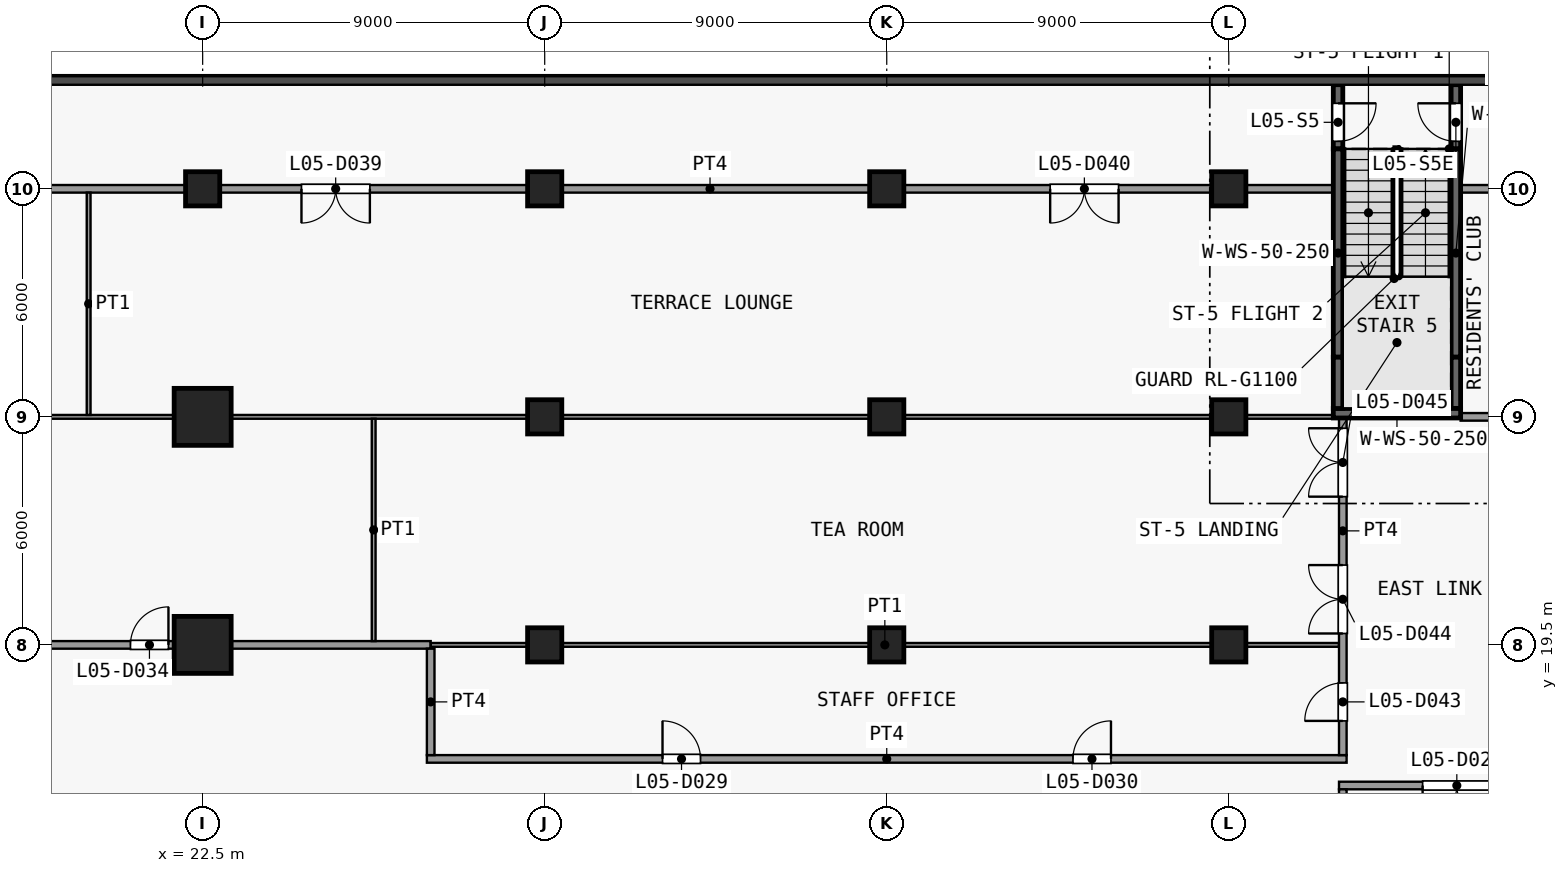
"""IFC4 building model, lengths in metres.
Left out: names, types, materials, properties, quantities, classifications, styles, units other than length and angle.
Written with IfcOpenShell. Run it as: python <this file> out.ifc"""

import sys

from ifc_helpers import new_model, si_unit, direction, frame, frame_2d, origin, origin_2d, place, context, subcontext, project, spatial, rectangle, extrude, element, fill, save


model = new_model("IFC4")
c1 = context("Model", 3, precision=1e-05, world=origin(), true_north=direction((0.0, 1.0)))
c2 = subcontext(c1, "Body", "Model", "MODEL_VIEW")
j1 = project(units=[si_unit("LENGTHUNIT", "METRE"), si_unit("PLANEANGLEUNIT", "RADIAN")], contexts=[c1])
p1 = place(None, origin())
s1 = spatial("IfcSite", under=j1, at=p1, CompositionType="ELEMENT")
p2 = place(p1, origin())
s2 = spatial("IfcBuilding", under=s1, at=p2, CompositionType="ELEMENT")
p3 = place(p2, frame((0.0, 0.0, 28.0)))
s3 = spatial("IfcBuildingStorey", under=s2, at=p3, CompositionType="ELEMENT", Elevation=28.0)
for number, where, z_axis, x_axis in (
    (1, (22.5, 19.5, 0.0), (0.0, 0.0, 1.0), (1.0, 0.0, 0.0)),
    (2, (22.5, 25.5, 0.0), (0.0, 0.0, 1.0), (1.0, 0.0, 0.0)),
):
    element("IfcColumn", number, at=place(p3, frame(where, z_axis=z_axis, x_axis=x_axis)), inside=s3, PredefinedType="COLUMN", context=c2, shape_type="SweptSolid", body=[
        extrude(rectangle(XDim=1.5, YDim=1.5, at=origin_2d()), origin(), (0.0, 0.0, 1.0), 4.5),
    ])
for number, where, z_axis, x_axis in (
    (3, (22.5, 31.5, 0.0), (0.0, 0.0, 1.0), (1.0, 0.0, 0.0)),
    (4, (31.5, 19.5, 0.0), (0.0, 0.0, 1.0), (1.0, 0.0, 0.0)),
    (5, (31.5, 25.5, 0.0), (0.0, 0.0, 1.0), (1.0, 0.0, 0.0)),
    (6, (31.5, 31.5, 0.0), (0.0, 0.0, 1.0), (1.0, 0.0, 0.0)),
    (7, (40.5, 19.5, 0.0), (0.0, 0.0, 1.0), (1.0, 0.0, 0.0)),
    (8, (40.5, 25.5, 0.0), (0.0, 0.0, 1.0), (1.0, 0.0, 0.0)),
    (9, (40.5, 31.5, 0.0), (0.0, 0.0, 1.0), (1.0, 0.0, 0.0)),
    (10, (49.5, 19.5, 0.0), (0.0, 0.0, 1.0), (1.0, 0.0, 0.0)),
    (11, (49.5, 25.5, 0.0), (0.0, 0.0, 1.0), (1.0, 0.0, 0.0)),
    (12, (49.5, 31.5, 0.0), (0.0, 0.0, 1.0), (1.0, 0.0, 0.0)),
):
    element("IfcColumn", number, at=place(p3, frame(where, z_axis=z_axis, x_axis=x_axis)), inside=s3, PredefinedType="COLUMN", context=c2, shape_type="SweptSolid", body=[
        extrude(rectangle(XDim=0.9, YDim=0.9, at=origin_2d()), origin(), (0.0, 0.0, 1.0), 4.5),
    ])
p4 = place(p3, frame((52.375, 34.24, 0.0), z_axis=(0.0, 0.0, 1.0), x_axis=(0.0, -1.0, 0.0)))
e13 = element("IfcWall", 13, at=p4, inside=s3, PredefinedType="SHEAR", context=c2, shape_type="SweptSolid", body=[
    extrude(rectangle(XDim=1.69, YDim=0.25, at=frame_2d((0.845, 0.0))), origin(), (0.0, 0.0, 1.0), 4.1),
])
p5 = place(p4, frame((0.49, 0.0, 0.0)))
e14 = element("IfcOpeningElement", 14, at=p5, cuts=e13, PredefinedType="OPENING", context=c2, shape_type="SweptSolid", body=[
    extrude(rectangle(XDim=1.0, YDim=2.1, at=frame_2d((0.5, 1.05))), frame((0.0, 0.135, 0.0), z_axis=(0.0, -1.0, 0.0), x_axis=(1.0, 0.0, 0.0)), (0.0, 0.0, 1.0), 0.27),
])
p6 = place(p3, frame((52.375, 27.07, 0.0), z_axis=(0.0, 0.0, 1.0), x_axis=(0.0, 1.0, 0.0)))
e15 = element("IfcWall", 15, at=p6, inside=s3, PredefinedType="SHEAR", context=c2, shape_type="SweptSolid", body=[
    extrude(rectangle(XDim=5.48, YDim=0.25, at=frame_2d((2.74, 0.0))), origin(), (0.0, 0.0, 1.0), 4.1),
])
p7 = place(p3, frame((52.375, 25.72, 0.0), z_axis=(0.0, 0.0, 1.0), x_axis=(0.0, 1.0, 0.0)))
e16 = element("IfcWall", 16, at=p7, inside=s3, PredefinedType="SHEAR", context=c2, shape_type="SweptSolid", body=[
    extrude(rectangle(XDim=1.35, YDim=0.25, at=frame_2d((0.675, 0.0))), origin(), (0.0, 0.0, 1.0), 4.1),
])
p8 = place(p3, frame((55.475, 32.55, 0.0), z_axis=(0.0, 0.0, 1.0), x_axis=(0.0, 1.0, 0.0)))
e17 = element("IfcWall", 17, at=p8, inside=s3, PredefinedType="SHEAR", context=c2, shape_type="SweptSolid", body=[
    extrude(rectangle(XDim=1.69, YDim=0.25, at=frame_2d((0.845, 0.0))), origin(), (0.0, 0.0, 1.0), 4.1),
])
p9 = place(p8, frame((0.2, 0.0, 0.0)))
e18 = element("IfcOpeningElement", 18, at=p9, cuts=e17, PredefinedType="OPENING", context=c2, shape_type="SweptSolid", body=[
    extrude(rectangle(XDim=1.0, YDim=2.1, at=frame_2d((0.5, 1.05))), frame((0.0, 0.135, 0.0), z_axis=(0.0, -1.0, 0.0), x_axis=(1.0, 0.0, 0.0)), (0.0, 0.0, 1.0), 0.27),
])
p10 = place(p3, frame((55.475, 27.07, 0.0), z_axis=(0.0, 0.0, 1.0), x_axis=(0.0, 1.0, 0.0)))
e19 = element("IfcWall", 19, at=p10, inside=s3, PredefinedType="SHEAR", context=c2, shape_type="SweptSolid", body=[
    extrude(rectangle(XDim=5.48, YDim=0.25, at=frame_2d((2.74, 0.0))), origin(), (0.0, 0.0, 1.0), 4.1),
])
p11 = place(p3, frame((55.475, 25.72, 0.0), z_axis=(0.0, 0.0, 1.0), x_axis=(0.0, 1.0, 0.0)))
e20 = element("IfcWall", 20, at=p11, inside=s3, PredefinedType="SHEAR", context=c2, shape_type="SweptSolid", body=[
    extrude(rectangle(XDim=1.35, YDim=0.25, at=frame_2d((0.675, 0.0))), origin(), (0.0, 0.0, 1.0), 4.1),
])
p12 = place(p3, frame((52.25, 25.595, 0.0), z_axis=(0.0, 0.0, 1.0), x_axis=(1.0, 0.0, 0.0)))
e21 = element("IfcWall", 21, at=p12, inside=s3, PredefinedType="SHEAR", context=c2, shape_type="SweptSolid", body=[
    extrude(rectangle(XDim=3.35, YDim=0.25, at=frame_2d((1.675, 0.0))), origin(), (0.0, 0.0, 1.0), 4.1),
])
p13 = place(p3, frame((52.4, 15.8, 0.0), z_axis=(0.0, 0.0, 1.0), x_axis=(1.0, 0.0, 0.0)))
e22 = element("IfcWall", 22, at=p13, inside=s3, PredefinedType="PARTITIONING", context=c2, shape_type="SweptSolid", body=[
    extrude(rectangle(XDim=6.2, YDim=0.2, at=frame_2d((3.1, 0.0))), origin(), (0.0, 0.0, 1.0), 4.1),
])
p14 = place(p13, frame((2.2, 0.0, 0.0)))
e23 = element("IfcOpeningElement", 23, at=p14, cuts=e22, PredefinedType="OPENING", context=c2, shape_type="SweptSolid", body=[
    extrude(rectangle(XDim=1.8, YDim=2.1, at=frame_2d((0.9, 1.05))), frame((0.0, 0.11, 0.0), z_axis=(0.0, -1.0, 0.0), x_axis=(1.0, 0.0, 0.0)), (0.0, 0.0, 1.0), 0.22),
])
p15 = place(p3, frame((28.4, 16.5, 0.0), z_axis=(0.0, 0.0, 1.0), x_axis=(1.0, 0.0, 0.0)))
e24 = element("IfcWall", 24, at=p15, inside=s3, PredefinedType="PARTITIONING", context=c2, shape_type="SweptSolid", body=[
    extrude(rectangle(XDim=24.2, YDim=0.2, at=frame_2d((12.1, 0.0))), origin(), (0.0, 0.0, 1.0), 4.1),
])
p16 = place(p15, frame((6.2, 0.0, 0.0)))
e25 = element("IfcOpeningElement", 25, at=p16, cuts=e24, PredefinedType="OPENING", context=c2, shape_type="SweptSolid", body=[
    extrude(rectangle(XDim=1.0, YDim=2.1, at=frame_2d((0.5, 1.05))), frame((0.0, 0.11, 0.0), z_axis=(0.0, -1.0, 0.0), x_axis=(1.0, 0.0, 0.0)), (0.0, 0.0, 1.0), 0.22),
])
p17 = place(p15, frame((17.0, 0.0, 0.0)))
e26 = element("IfcOpeningElement", 26, at=p17, cuts=e24, PredefinedType="OPENING", context=c2, shape_type="SweptSolid", body=[
    extrude(rectangle(XDim=1.0, YDim=2.1, at=frame_2d((0.5, 1.05))), frame((0.0, 0.11, 0.0), z_axis=(0.0, -1.0, 0.0), x_axis=(1.0, 0.0, 0.0)), (0.0, 0.0, 1.0), 0.22),
])
p18 = place(p3, frame((-31.6, 19.5, 0.0), z_axis=(0.0, 0.0, 1.0), x_axis=(1.0, 0.0, 0.0)))
e27 = element("IfcWall", 27, at=p18, inside=s3, PredefinedType="PARTITIONING", context=c2, shape_type="SweptSolid", body=[
    extrude(rectangle(XDim=60.1, YDim=0.2, at=frame_2d((30.05, 0.0))), origin(), (0.0, 0.0, 1.0), 4.1),
])
p19 = place(p18, frame((6.3, 0.0, 0.0)))
e28 = element("IfcOpeningElement", 28, at=p19, cuts=e27, PredefinedType="OPENING", context=c2, shape_type="SweptSolid", body=[
    extrude(rectangle(XDim=1.0, YDim=2.1, at=frame_2d((0.5, 1.05))), frame((0.0, 0.11, 0.0), z_axis=(0.0, -1.0, 0.0), x_axis=(1.0, 0.0, 0.0)), (0.0, 0.0, 1.0), 0.22),
])
p20 = place(p18, frame((25.2, 0.0, 0.0)))
e29 = element("IfcOpeningElement", 29, at=p20, cuts=e27, PredefinedType="OPENING", context=c2, shape_type="SweptSolid", body=[
    extrude(rectangle(XDim=1.0, YDim=2.1, at=frame_2d((0.5, 1.05))), frame((0.0, 0.11, 0.0), z_axis=(0.0, -1.0, 0.0), x_axis=(1.0, 0.0, 0.0)), (0.0, 0.0, 1.0), 0.22),
])
p21 = place(p18, frame((38.1, 0.0, 0.0)))
e30 = element("IfcOpeningElement", 30, at=p21, cuts=e27, PredefinedType="OPENING", context=c2, shape_type="SweptSolid", body=[
    extrude(rectangle(XDim=1.0, YDim=2.1, at=frame_2d((0.5, 1.05))), frame((0.0, 0.11, 0.0), z_axis=(0.0, -1.0, 0.0), x_axis=(1.0, 0.0, 0.0)), (0.0, 0.0, 1.0), 0.22),
])
p22 = place(p18, frame((52.2, 0.0, 0.0)))
e31 = element("IfcOpeningElement", 31, at=p22, cuts=e27, PredefinedType="OPENING", context=c2, shape_type="SweptSolid", body=[
    extrude(rectangle(XDim=1.0, YDim=2.1, at=frame_2d((0.5, 1.05))), frame((0.0, 0.11, 0.0), z_axis=(0.0, -1.0, 0.0), x_axis=(1.0, 0.0, 0.0)), (0.0, 0.0, 1.0), 0.22),
])
p23 = place(p3, frame((28.5, 19.5, 0.0), z_axis=(0.0, 0.0, 1.0), x_axis=(1.0, 0.0, 0.0)))
e32 = element("IfcWall", 32, at=p23, inside=s3, PredefinedType="PARTITIONING", context=c2, shape_type="SweptSolid", body=[
    extrude(rectangle(XDim=23.9, YDim=0.1, at=frame_2d((11.95, 0.0))), origin(), (0.0, 0.0, 1.0), 4.1),
])
p24 = place(p3, frame((55.6, 25.5, 0.0), z_axis=(0.0, 0.0, 1.0), x_axis=(1.0, 0.0, 0.0)))
e33 = element("IfcWall", 33, at=p24, inside=s3, PredefinedType="PARTITIONING", context=c2, shape_type="SweptSolid", body=[
    extrude(rectangle(XDim=3.0, YDim=0.2, at=frame_2d((1.5, 0.0))), origin(), (0.0, 0.0, 1.0), 4.1),
])
p25 = place(p3, frame((-25.9, 25.5, 0.0), z_axis=(0.0, 0.0, 1.0), x_axis=(1.0, 0.0, 0.0)))
e34 = element("IfcWall", 34, at=p25, inside=s3, PredefinedType="PARTITIONING", context=c2, shape_type="SweptSolid", body=[
    extrude(rectangle(XDim=78.15, YDim=0.1, at=frame_2d((39.075, 0.0))), origin(), (0.0, 0.0, 1.0), 4.1),
])
p26 = place(p3, frame((-25.9, 31.5, 0.0), z_axis=(0.0, 0.0, 1.0), x_axis=(1.0, 0.0, 0.0)))
e35 = element("IfcWall", 35, at=p26, inside=s3, PredefinedType="PARTITIONING", context=c2, shape_type="SweptSolid", body=[
    extrude(rectangle(XDim=78.15, YDim=0.2, at=frame_2d((39.075, 0.0))), origin(), (0.0, 0.0, 1.0), 4.1),
])
p27 = place(p26, frame((4.1, 0.0, 0.0)))
e36 = element("IfcOpeningElement", 36, at=p27, cuts=e35, PredefinedType="OPENING", context=c2, shape_type="SweptSolid", body=[
    extrude(rectangle(XDim=1.0, YDim=2.1, at=frame_2d((0.5, 1.05))), frame((0.0, 0.11, 0.0), z_axis=(0.0, -1.0, 0.0), x_axis=(1.0, 0.0, 0.0)), (0.0, 0.0, 1.0), 0.22),
])
p28 = place(p26, frame((17.8, 0.0, 0.0)))
e37 = element("IfcOpeningElement", 37, at=p28, cuts=e35, PredefinedType="OPENING", context=c2, shape_type="SweptSolid", body=[
    extrude(rectangle(XDim=1.0, YDim=2.1, at=frame_2d((0.5, 1.05))), frame((0.0, 0.11, 0.0), z_axis=(0.0, -1.0, 0.0), x_axis=(1.0, 0.0, 0.0)), (0.0, 0.0, 1.0), 0.22),
])
p29 = place(p26, frame((26.9, 0.0, 0.0)))
e38 = element("IfcOpeningElement", 38, at=p29, cuts=e35, PredefinedType="OPENING", context=c2, shape_type="SweptSolid", body=[
    extrude(rectangle(XDim=1.0, YDim=2.1, at=frame_2d((0.5, 1.05))), frame((0.0, 0.11, 0.0), z_axis=(0.0, -1.0, 0.0), x_axis=(1.0, 0.0, 0.0)), (0.0, 0.0, 1.0), 0.22),
])
p30 = place(p26, frame((40.4, 0.0, 0.0)))
e39 = element("IfcOpeningElement", 39, at=p30, cuts=e35, PredefinedType="OPENING", context=c2, shape_type="SweptSolid", body=[
    extrude(rectangle(XDim=1.0, YDim=2.1, at=frame_2d((0.5, 1.05))), frame((0.0, 0.11, 0.0), z_axis=(0.0, -1.0, 0.0), x_axis=(1.0, 0.0, 0.0)), (0.0, 0.0, 1.0), 0.22),
])
p31 = place(p26, frame((51.0, 0.0, 0.0)))
e40 = element("IfcOpeningElement", 40, at=p31, cuts=e35, PredefinedType="OPENING", context=c2, shape_type="SweptSolid", body=[
    extrude(rectangle(XDim=1.8, YDim=2.1, at=frame_2d((0.9, 1.05))), frame((0.0, 0.11, 0.0), z_axis=(0.0, -1.0, 0.0), x_axis=(1.0, 0.0, 0.0)), (0.0, 0.0, 1.0), 0.22),
])
p32 = place(p26, frame((70.7, 0.0, 0.0)))
e41 = element("IfcOpeningElement", 41, at=p32, cuts=e35, PredefinedType="OPENING", context=c2, shape_type="SweptSolid", body=[
    extrude(rectangle(XDim=1.8, YDim=2.1, at=frame_2d((0.9, 1.05))), frame((0.0, 0.11, 0.0), z_axis=(0.0, -1.0, 0.0), x_axis=(1.0, 0.0, 0.0)), (0.0, 0.0, 1.0), 0.22),
])
p33 = place(p3, frame((55.6, 31.5, 0.0), z_axis=(0.0, 0.0, 1.0), x_axis=(1.0, 0.0, 0.0)))
e42 = element("IfcWall", 42, at=p33, inside=s3, PredefinedType="PARTITIONING", context=c2, shape_type="SweptSolid", body=[
    extrude(rectangle(XDim=3.0, YDim=0.2, at=frame_2d((1.5, 0.0))), origin(), (0.0, 0.0, 1.0), 4.1),
])
for number, where, z_axis, x_axis in (
    (43, (19.5, 25.55, 0.0), (0.0, 0.0, 1.0), (0.0, 1.0, 0.0)),
    (44, (27.0, 19.6, 0.0), (0.0, 0.0, 1.0), (0.0, 1.0, 0.0)),
):
    element("IfcWall", number, at=place(p3, frame(where, z_axis=z_axis, x_axis=x_axis)), inside=s3, PredefinedType="PARTITIONING", context=c2, shape_type="SweptSolid", body=[
        extrude(rectangle(XDim=5.85, YDim=0.1, at=frame_2d((2.925, 0.0))), origin(), (0.0, 0.0, 1.0), 4.1),
    ])
p34 = place(p3, frame((28.5, 16.6, 0.0), z_axis=(0.0, 0.0, 1.0), x_axis=(0.0, 1.0, 0.0)))
e45 = element("IfcWall", 45, at=p34, inside=s3, PredefinedType="PARTITIONING", context=c2, shape_type="SweptSolid", body=[
    extrude(rectangle(XDim=2.8, YDim=0.2, at=frame_2d((1.4, 0.0))), origin(), (0.0, 0.0, 1.0), 4.1),
])
p35 = place(p3, frame((52.5, -16.5, 0.0), z_axis=(0.0, 0.0, 1.0), x_axis=(0.0, 1.0, 0.0)))
e46 = element("IfcWall", 46, at=p35, inside=s3, PredefinedType="PARTITIONING", context=c2, shape_type="SweptSolid", body=[
    extrude(rectangle(XDim=32.2, YDim=0.2, at=frame_2d((16.1, 0.0))), origin(), (0.0, 0.0, 1.0), 4.1),
])
p36 = place(p3, frame((52.5, 16.6, 0.0), z_axis=(0.0, 0.0, 1.0), x_axis=(0.0, 1.0, 0.0)))
e47 = element("IfcWall", 47, at=p36, inside=s3, PredefinedType="PARTITIONING", context=c2, shape_type="SweptSolid", body=[
    extrude(rectangle(XDim=8.87, YDim=0.2, at=frame_2d((4.435, 0.0))), origin(), (0.0, 0.0, 1.0), 4.1),
])
p37 = place(p36, frame((0.9, 0.0, 0.0)))
e48 = element("IfcOpeningElement", 48, at=p37, cuts=e47, PredefinedType="OPENING", context=c2, shape_type="SweptSolid", body=[
    extrude(rectangle(XDim=1.0, YDim=2.1, at=frame_2d((0.5, 1.05))), frame((0.0, 0.11, 0.0), z_axis=(0.0, -1.0, 0.0), x_axis=(1.0, 0.0, 0.0)), (0.0, 0.0, 1.0), 0.22),
])
p38 = place(p36, frame((3.2, 0.0, 0.0)))
e49 = element("IfcOpeningElement", 49, at=p38, cuts=e47, PredefinedType="OPENING", context=c2, shape_type="SweptSolid", body=[
    extrude(rectangle(XDim=1.8, YDim=2.1, at=frame_2d((0.9, 1.05))), frame((0.0, 0.11, 0.0), z_axis=(0.0, -1.0, 0.0), x_axis=(1.0, 0.0, 0.0)), (0.0, 0.0, 1.0), 0.22),
])
p39 = place(p36, frame((6.8, 0.0, 0.0)))
e50 = element("IfcOpeningElement", 50, at=p39, cuts=e47, PredefinedType="OPENING", context=c2, shape_type="SweptSolid", body=[
    extrude(rectangle(XDim=1.8, YDim=2.1, at=frame_2d((0.9, 1.05))), frame((0.0, 0.11, 0.0), z_axis=(0.0, -1.0, 0.0), x_axis=(1.0, 0.0, 0.0)), (0.0, 0.0, 1.0), 0.22),
])
p40 = place(p5, origin())
e51 = element("IfcDoor", 51, at=p40, inside=s3, OperationType="SINGLE_SWING_LEFT", PredefinedType="DOOR", context=c2, shape_type="SweptSolid", body=[
    extrude(rectangle(XDim=1.0, YDim=2.1, at=frame_2d((0.5, 1.05))), frame((0.0, 0.025, 0.0), z_axis=(0.0, -1.0, 0.0), x_axis=(1.0, 0.0, 0.0)), (0.0, 0.0, 1.0), 0.05),
])
fill(e14, e51)
p41 = place(p9, origin())
e52 = element("IfcDoor", 52, at=p41, inside=s3, OperationType="SINGLE_SWING_RIGHT", PredefinedType="DOOR", context=c2, shape_type="SweptSolid", body=[
    extrude(rectangle(XDim=1.0, YDim=2.1, at=frame_2d((0.5, 1.05))), frame((0.0, 0.025, 0.0), z_axis=(0.0, -1.0, 0.0), x_axis=(1.0, 0.0, 0.0)), (0.0, 0.0, 1.0), 0.05),
])
fill(e18, e52)
p42 = place(p14, origin())
e53 = element("IfcDoor", 53, at=p42, inside=s3, OperationType="DOUBLE_DOOR_SINGLE_SWING", PredefinedType="DOOR", context=c2, shape_type="SweptSolid", body=[
    extrude(rectangle(XDim=1.8, YDim=2.1, at=frame_2d((0.9, 1.05))), frame((0.0, 0.025, 0.0), z_axis=(0.0, -1.0, 0.0), x_axis=(1.0, 0.0, 0.0)), (0.0, 0.0, 1.0), 0.05),
])
fill(e23, e53)
p43 = place(p16, origin())
e54 = element("IfcDoor", 54, at=p43, inside=s3, OperationType="SINGLE_SWING_RIGHT", PredefinedType="DOOR", context=c2, shape_type="SweptSolid", body=[
    extrude(rectangle(XDim=1.0, YDim=2.1, at=frame_2d((0.5, 1.05))), frame((0.0, 0.025, 0.0), z_axis=(0.0, -1.0, 0.0), x_axis=(1.0, 0.0, 0.0)), (0.0, 0.0, 1.0), 0.05),
])
fill(e25, e54)
p44 = place(p17, origin())
e55 = element("IfcDoor", 55, at=p44, inside=s3, OperationType="SINGLE_SWING_LEFT", PredefinedType="DOOR", context=c2, shape_type="SweptSolid", body=[
    extrude(rectangle(XDim=1.0, YDim=2.1, at=frame_2d((0.5, 1.05))), frame((0.0, 0.025, 0.0), z_axis=(0.0, -1.0, 0.0), x_axis=(1.0, 0.0, 0.0)), (0.0, 0.0, 1.0), 0.05),
])
fill(e26, e55)
p45 = place(p22, origin())
e56 = element("IfcDoor", 56, at=p45, inside=s3, OperationType="SINGLE_SWING_LEFT", PredefinedType="DOOR", context=c2, shape_type="SweptSolid", body=[
    extrude(rectangle(XDim=1.0, YDim=2.1, at=frame_2d((0.5, 1.05))), frame((0.0, 0.025, 0.0), z_axis=(0.0, -1.0, 0.0), x_axis=(1.0, 0.0, 0.0)), (0.0, 0.0, 1.0), 0.05),
])
fill(e31, e56)
p46 = place(p31, origin())
e57 = element("IfcDoor", 57, at=p46, inside=s3, OperationType="DOUBLE_DOOR_SINGLE_SWING", PredefinedType="DOOR", context=c2, shape_type="SweptSolid", body=[
    extrude(rectangle(XDim=1.8, YDim=2.1, at=frame_2d((0.9, 1.05))), frame((0.0, 0.025, 0.0), z_axis=(0.0, -1.0, 0.0), x_axis=(1.0, 0.0, 0.0)), (0.0, 0.0, 1.0), 0.05),
])
fill(e40, e57)
p47 = place(p32, origin())
e58 = element("IfcDoor", 58, at=p47, inside=s3, OperationType="DOUBLE_DOOR_SINGLE_SWING", PredefinedType="DOOR", context=c2, shape_type="SweptSolid", body=[
    extrude(rectangle(XDim=1.8, YDim=2.1, at=frame_2d((0.9, 1.05))), frame((0.0, 0.025, 0.0), z_axis=(0.0, -1.0, 0.0), x_axis=(1.0, 0.0, 0.0)), (0.0, 0.0, 1.0), 0.05),
])
fill(e41, e58)
p48 = place(p37, origin())
e59 = element("IfcDoor", 59, at=p48, inside=s3, OperationType="SINGLE_SWING_RIGHT", PredefinedType="DOOR", context=c2, shape_type="SweptSolid", body=[
    extrude(rectangle(XDim=1.0, YDim=2.1, at=frame_2d((0.5, 1.05))), frame((0.0, 0.025, 0.0), z_axis=(0.0, -1.0, 0.0), x_axis=(1.0, 0.0, 0.0)), (0.0, 0.0, 1.0), 0.05),
])
fill(e48, e59)
p49 = place(p38, origin())
e60 = element("IfcDoor", 60, at=p49, inside=s3, OperationType="DOUBLE_DOOR_SINGLE_SWING", PredefinedType="DOOR", context=c2, shape_type="SweptSolid", body=[
    extrude(rectangle(XDim=1.8, YDim=2.1, at=frame_2d((0.9, 1.05))), frame((0.0, 0.025, 0.0), z_axis=(0.0, -1.0, 0.0), x_axis=(1.0, 0.0, 0.0)), (0.0, 0.0, 1.0), 0.05),
])
fill(e49, e60)
p50 = place(p39, origin())
e61 = element("IfcDoor", 61, at=p50, inside=s3, OperationType="DOUBLE_DOOR_SINGLE_SWING", PredefinedType="DOOR", context=c2, shape_type="SweptSolid", body=[
    extrude(rectangle(XDim=1.8, YDim=2.1, at=frame_2d((0.9, 1.05))), frame((0.0, 0.025, 0.0), z_axis=(0.0, -1.0, 0.0), x_axis=(1.0, 0.0, 0.0)), (0.0, 0.0, 1.0), 0.05),
])
fill(e50, e61)
save(model, sys.argv[1])
